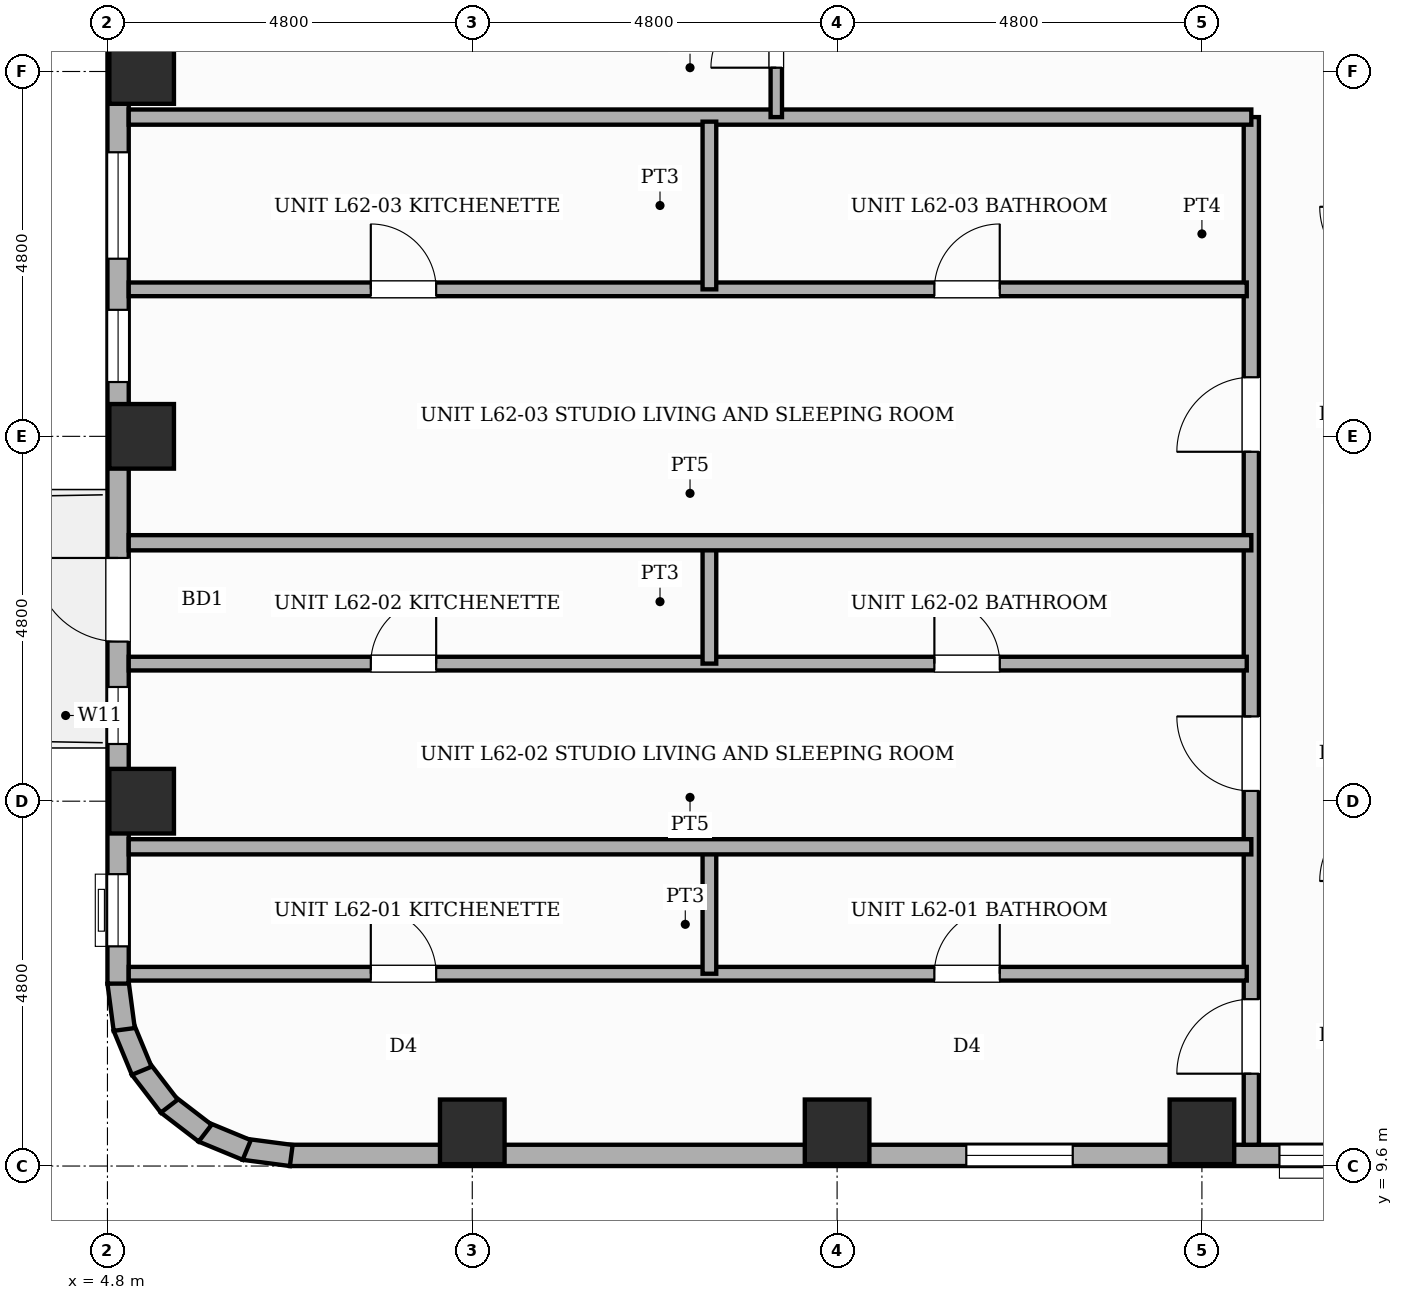
"""IFC4 building model, lengths in metres.
Left out: names, types, materials, properties, quantities, classifications, styles, units other than length and angle.
Written with IfcOpenShell. Run it as: python <this file> out.ifc"""

import sys

from ifc_helpers import new_model, si_unit, direction, frame, frame_2d, origin, origin_2d, place, context, subcontext, project, spatial, rectangle, extrude, element, fill, save


model = new_model("IFC4")
c1 = context("Model", 3, precision=1e-05, world=origin(), true_north=direction((0.0, 1.0)))
c2 = subcontext(c1, "Body", "Model", "MODEL_VIEW")
j1 = project(units=[si_unit("LENGTHUNIT", "METRE"), si_unit("PLANEANGLEUNIT", "RADIAN")], contexts=[c1])
p1 = place(None, origin())
s1 = spatial("IfcSite", under=j1, at=p1, CompositionType="ELEMENT")
p2 = place(p1, origin())
s2 = spatial("IfcBuilding", under=s1, at=p2, CompositionType="ELEMENT")
p3 = place(p2, frame((0.0, 0.0, 236.2)))
s3 = spatial("IfcBuildingStorey", under=s2, at=p3, CompositionType="ELEMENT", Elevation=236.2)
for number, where, z_axis, x_axis in (
    (1, (5.25, 14.4, 0.0), (0.0, 0.0, 1.0), (1.0, 0.0, 0.0)),
    (2, (5.25, 19.2, 0.0), (0.0, 0.0, 1.0), (1.0, 0.0, 0.0)),
    (3, (5.25, 24.0, 0.0), (0.0, 0.0, 1.0), (1.0, 0.0, 0.0)),
    (4, (9.6, 10.05, 0.0), (0.0, 0.0, 1.0), (1.0, 0.0, 0.0)),
    (5, (14.4, 10.05, 0.0), (0.0, 0.0, 1.0), (1.0, 0.0, 0.0)),
    (6, (19.2, 10.05, 0.0), (0.0, 0.0, 1.0), (1.0, 0.0, 0.0)),
):
    element("IfcColumn", number, at=place(p3, frame(where, z_axis=z_axis, x_axis=x_axis)), inside=s3, PredefinedType="COLUMN", context=c2, shape_type="SweptSolid", body=[
        extrude(rectangle(XDim=0.85, YDim=0.85, at=origin_2d()), origin(), (0.0, 0.0, 1.0), 3.6),
    ])
p4 = place(p3, frame((21.6, 9.74, 0.0), z_axis=(0.0, 0.0, 1.0), x_axis=(-1.0, 0.0, 0.0)))
e7 = element("IfcWall", 7, at=p4, inside=s3, PredefinedType="STANDARD", context=c2, shape_type="SweptSolid", body=[
    extrude(rectangle(XDim=14.4, YDim=0.28, at=frame_2d((7.2, 0.0))), origin(), (0.0, 0.0, 1.0), 2.6),
])
p5 = place(p4, frame((4.1, 0.0, 0.65)))
e8 = element("IfcOpeningElement", 8, at=p5, cuts=e7, PredefinedType="OPENING", context=c2, shape_type="SweptSolid", body=[
    extrude(rectangle(XDim=1.4, YDim=1.1, at=frame_2d((0.7, 0.55))), frame((0.0, 0.15, 0.0), z_axis=(0.0, -1.0, 0.0), x_axis=(1.0, 0.0, 0.0)), (0.0, 0.0, 1.0), 0.3),
])
p6 = place(p4, frame((0.43, 0.0, 0.45)))
e9 = element("IfcOpeningElement", 9, at=p6, cuts=e7, PredefinedType="OPENING", context=c2, shape_type="SweptSolid", body=[
    extrude(rectangle(XDim=0.95, YDim=1.8, at=frame_2d((0.475, 0.9))), frame((0.0, 0.15, 0.0), z_axis=(0.0, -1.0, 0.0), x_axis=(1.0, 0.0, 0.0)), (0.0, 0.0, 1.0), 0.3),
])
p7 = place(p3, frame((7.218, 9.739, 0.0), z_axis=(0.0, 0.0, 1.0), x_axis=(-0.9914410257, 0.130555323746, 0.0)))
e10 = element("IfcWall", 10, at=p7, inside=s3, PredefinedType="STANDARD", context=c2, shape_type="SweptSolid", body=[
    extrude(rectangle(XDim=0.626, YDim=0.28, at=frame_2d((0.313, 0.0))), origin(), (0.0, 0.0, 1.0), 3.32),
])
p8 = place(p3, frame((6.632, 9.811, 0.0), z_axis=(0.0, 0.0, 1.0), x_axis=(-0.923836271867, 0.382787856107, 0.0)))
e11 = element("IfcWall", 11, at=p8, inside=s3, PredefinedType="STANDARD", context=c2, shape_type="SweptSolid", body=[
    extrude(rectangle(XDim=0.626, YDim=0.28, at=frame_2d((0.313, 0.0))), origin(), (0.0, 0.0, 1.0), 3.32),
])
for number, where, z_axis, x_axis in (
    (12, (6.085, 10.033, 0.0), (0.0, 0.0, 1.0), (-0.793, 0.609, 0.0)),
    (13, (5.614, 10.388, 0.0), (0.0, 0.0, 1.0), (-0.609, 0.793, 0.0)),
    (14, (5.251, 10.854, 0.0), (0.0, 0.0, 1.0), (-0.383, 0.924, 0.0)),
    (15, (5.021, 11.397, 0.0), (0.0, 0.0, 1.0), (-0.131, 0.991, 0.0)),
):
    element("IfcWall", number, at=place(p3, frame(where, z_axis=z_axis, x_axis=x_axis)), inside=s3, PredefinedType="STANDARD", context=c2, shape_type="SweptSolid", body=[
        extrude(rectangle(XDim=0.626, YDim=0.28, at=frame_2d((0.313, 0.0))), origin(), (0.0, 0.0, 1.0), 3.32),
    ])
p9 = place(p3, frame((4.94, 12.0, 0.0), z_axis=(0.0, 0.0, 1.0), x_axis=(0.0, 1.0, 0.0)))
e16 = element("IfcWall", 16, at=p9, inside=s3, PredefinedType="STANDARD", context=c2, shape_type="SweptSolid", body=[
    extrude(rectangle(XDim=33.6, YDim=0.28, at=frame_2d((16.8, 0.0))), origin(), (0.0, 0.0, 1.0), 2.6),
])
p10 = place(p9, frame((4.5, 0.0, 0.0)))
e17 = element("IfcOpeningElement", 17, at=p10, cuts=e16, PredefinedType="OPENING", context=c2, shape_type="SweptSolid", body=[
    extrude(rectangle(XDim=1.1, YDim=2.15, at=frame_2d((0.55, 1.075))), frame((0.0, 0.15, 0.0), z_axis=(0.0, -1.0, 0.0), x_axis=(1.0, 0.0, 0.0)), (0.0, 0.0, 1.0), 0.3),
])
p11 = place(p9, frame((3.153, 0.0, 0.45)))
e18 = element("IfcOpeningElement", 18, at=p11, cuts=e16, PredefinedType="OPENING", context=c2, shape_type="SweptSolid", body=[
    extrude(rectangle(XDim=0.75, YDim=1.8, at=frame_2d((0.375, 0.9))), frame((0.0, 0.15, 0.0), z_axis=(0.0, -1.0, 0.0), x_axis=(1.0, 0.0, 0.0)), (0.0, 0.0, 1.0), 0.3),
])
p12 = place(p9, frame((7.915, 0.0, 0.45)))
e19 = element("IfcOpeningElement", 19, at=p12, cuts=e16, PredefinedType="OPENING", context=c2, shape_type="SweptSolid", body=[
    extrude(rectangle(XDim=0.95, YDim=1.8, at=frame_2d((0.475, 0.9))), frame((0.0, 0.15, 0.0), z_axis=(0.0, -1.0, 0.0), x_axis=(1.0, 0.0, 0.0)), (0.0, 0.0, 1.0), 0.3),
])
p13 = place(p9, frame((0.49, 0.0, 0.45)))
e20 = element("IfcOpeningElement", 20, at=p13, cuts=e16, PredefinedType="OPENING", context=c2, shape_type="SweptSolid", body=[
    extrude(rectangle(XDim=0.95, YDim=1.8, at=frame_2d((0.475, 0.9))), frame((0.0, 0.15, 0.0), z_axis=(0.0, -1.0, 0.0), x_axis=(1.0, 0.0, 0.0)), (0.0, 0.0, 1.0), 0.3),
])
p14 = place(p9, frame((9.537, 0.0, 0.65)))
e21 = element("IfcOpeningElement", 21, at=p14, cuts=e16, PredefinedType="OPENING", context=c2, shape_type="SweptSolid", body=[
    extrude(rectangle(XDim=1.4, YDim=1.1, at=frame_2d((0.7, 0.55))), frame((0.0, 0.15, 0.0), z_axis=(0.0, -1.0, 0.0), x_axis=(1.0, 0.0, 0.0)), (0.0, 0.0, 1.0), 0.3),
])
p15 = place(p9, frame((14.583, 0.0, 0.65)))
e22 = element("IfcOpeningElement", 22, at=p15, cuts=e16, PredefinedType="OPENING", context=c2, shape_type="SweptSolid", body=[
    extrude(rectangle(XDim=1.4, YDim=1.1, at=frame_2d((0.7, 0.55))), frame((0.0, 0.15, 0.0), z_axis=(0.0, -1.0, 0.0), x_axis=(1.0, 0.0, 0.0)), (0.0, 0.0, 1.0), 0.3),
])
p16 = place(p9, frame((12.718, 0.0, 0.45)))
e23 = element("IfcOpeningElement", 23, at=p16, cuts=e16, PredefinedType="OPENING", context=c2, shape_type="SweptSolid", body=[
    extrude(rectangle(XDim=0.75, YDim=1.8, at=frame_2d((0.375, 0.9))), frame((0.0, 0.15, 0.0), z_axis=(0.0, -1.0, 0.0), x_axis=(1.0, 0.0, 0.0)), (0.0, 0.0, 1.0), 0.3),
])
p17 = place(p3, frame((19.85, 9.88, 0.0), z_axis=(0.0, 0.0, 1.0), x_axis=(0.0, 1.0, 0.0)))
e24 = element("IfcWall", 24, at=p17, inside=s3, PredefinedType="PARTITIONING", context=c2, shape_type="SweptSolid", body=[
    extrude(rectangle(XDim=13.52, YDim=0.2, at=frame_2d((6.76, 0.0))), origin(), (0.0, 0.0, 1.0), 3.32),
])
p18 = place(p17, frame((0.935, 0.0, 0.0)))
e25 = element("IfcOpeningElement", 25, at=p18, cuts=e24, PredefinedType="OPENING", context=c2, shape_type="SweptSolid", body=[
    extrude(rectangle(XDim=0.98, YDim=2.18, at=frame_2d((0.49, 1.09))), frame((0.0, 0.11, 0.0), z_axis=(0.0, -1.0, 0.0), x_axis=(1.0, 0.0, 0.0)), (0.0, 0.0, 1.0), 0.22),
])
p19 = place(p17, frame((4.655, 0.0, 0.0)))
e26 = element("IfcOpeningElement", 26, at=p19, cuts=e24, PredefinedType="OPENING", context=c2, shape_type="SweptSolid", body=[
    extrude(rectangle(XDim=0.98, YDim=2.18, at=frame_2d((0.49, 1.09))), frame((0.0, 0.11, 0.0), z_axis=(0.0, -1.0, 0.0), x_axis=(1.0, 0.0, 0.0)), (0.0, 0.0, 1.0), 0.22),
])
p20 = place(p17, frame((9.117, 0.0, 0.0)))
e27 = element("IfcOpeningElement", 27, at=p20, cuts=e24, PredefinedType="OPENING", context=c2, shape_type="SweptSolid", body=[
    extrude(rectangle(XDim=0.98, YDim=2.18, at=frame_2d((0.49, 1.09))), frame((0.0, 0.11, 0.0), z_axis=(0.0, -1.0, 0.0), x_axis=(1.0, 0.0, 0.0)), (0.0, 0.0, 1.0), 0.22),
])
p21 = place(p3, frame((5.08, 23.4, 0.0), z_axis=(0.0, 0.0, 1.0), x_axis=(1.0, 0.0, 0.0)))
e28 = element("IfcWall", 28, at=p21, inside=s3, PredefinedType="PARTITIONING", context=c2, shape_type="SweptSolid", body=[
    extrude(rectangle(XDim=14.77, YDim=0.2, at=frame_2d((7.385, 0.0))), origin(), (0.0, 0.0, 1.0), 3.32),
])
p22 = place(p3, frame((13.6, 23.4, 0.0), z_axis=(0.0, 0.0, 1.0), x_axis=(0.0, 1.0, 0.0)))
e29 = element("IfcWall", 29, at=p22, inside=s3, PredefinedType="PARTITIONING", context=c2, shape_type="SweptSolid", body=[
    extrude(rectangle(XDim=2.35, YDim=0.15, at=frame_2d((1.175, 0.0))), origin(), (0.0, 0.0, 1.0), 3.32),
])
p23 = place(p22, frame((0.65, 0.0, 0.0)))
e30 = element("IfcOpeningElement", 30, at=p23, cuts=e29, PredefinedType="OPENING", context=c2, shape_type="SweptSolid", body=[
    extrude(rectangle(XDim=0.86, YDim=2.1, at=frame_2d((0.43, 1.05))), frame((0.0, 0.085, 0.0), z_axis=(0.0, -1.0, 0.0), x_axis=(1.0, 0.0, 0.0)), (0.0, 0.0, 1.0), 0.17),
])
p24 = place(p3, frame((5.08, 12.13, 0.0), z_axis=(0.0, 0.0, 1.0), x_axis=(1.0, 0.0, 0.0)))
e31 = element("IfcWall", 31, at=p24, inside=s3, PredefinedType="PLUMBINGWALL", context=c2, shape_type="SweptSolid", body=[
    extrude(rectangle(XDim=14.71, YDim=0.18, at=frame_2d((7.355, 0.0))), origin(), (0.0, 0.0, 1.0), 3.32),
])
p25 = place(p24, frame((3.185, 0.0, 0.0)))
e32 = element("IfcOpeningElement", 32, at=p25, cuts=e31, PredefinedType="OPENING", context=c2, shape_type="SweptSolid", body=[
    extrude(rectangle(XDim=0.86, YDim=2.1, at=frame_2d((0.43, 1.05))), frame((0.0, 0.1, 0.0), z_axis=(0.0, -1.0, 0.0), x_axis=(1.0, 0.0, 0.0)), (0.0, 0.0, 1.0), 0.2),
])
p26 = place(p24, frame((10.6, 0.0, 0.0)))
e33 = element("IfcOpeningElement", 33, at=p26, cuts=e31, PredefinedType="OPENING", context=c2, shape_type="SweptSolid", body=[
    extrude(rectangle(XDim=0.86, YDim=2.1, at=frame_2d((0.43, 1.05))), frame((0.0, 0.1, 0.0), z_axis=(0.0, -1.0, 0.0), x_axis=(1.0, 0.0, 0.0)), (0.0, 0.0, 1.0), 0.2),
])
p27 = place(p3, frame((12.72, 12.13, 0.0), z_axis=(0.0, 0.0, 1.0), x_axis=(0.0, 1.0, 0.0)))
e34 = element("IfcWall", 34, at=p27, inside=s3, PredefinedType="PLUMBINGWALL", context=c2, shape_type="SweptSolid", body=[
    extrude(rectangle(XDim=1.71, YDim=0.18, at=frame_2d((0.855, 0.0))), origin(), (0.0, 0.0, 1.0), 3.32),
])
p28 = place(p3, frame((5.08, 13.8, 0.0), z_axis=(0.0, 0.0, 1.0), x_axis=(1.0, 0.0, 0.0)))
e35 = element("IfcWall", 35, at=p28, inside=s3, PredefinedType="SOLIDWALL", context=c2, shape_type="SweptSolid", body=[
    extrude(rectangle(XDim=14.77, YDim=0.2, at=frame_2d((7.385, 0.0))), origin(), (0.0, 0.0, 1.0), 3.32),
])
p29 = place(p3, frame((5.08, 16.21, 0.0), z_axis=(0.0, 0.0, 1.0), x_axis=(1.0, 0.0, 0.0)))
e36 = element("IfcWall", 36, at=p29, inside=s3, PredefinedType="PLUMBINGWALL", context=c2, shape_type="SweptSolid", body=[
    extrude(rectangle(XDim=14.71, YDim=0.18, at=frame_2d((7.355, 0.0))), origin(), (0.0, 0.0, 1.0), 3.32),
])
p30 = place(p29, frame((3.185, 0.0, 0.0)))
e37 = element("IfcOpeningElement", 37, at=p30, cuts=e36, PredefinedType="OPENING", context=c2, shape_type="SweptSolid", body=[
    extrude(rectangle(XDim=0.86, YDim=2.1, at=frame_2d((0.43, 1.05))), frame((0.0, 0.1, 0.0), z_axis=(0.0, -1.0, 0.0), x_axis=(1.0, 0.0, 0.0)), (0.0, 0.0, 1.0), 0.2),
])
p31 = place(p29, frame((10.6, 0.0, 0.0)))
e38 = element("IfcOpeningElement", 38, at=p31, cuts=e36, PredefinedType="OPENING", context=c2, shape_type="SweptSolid", body=[
    extrude(rectangle(XDim=0.86, YDim=2.1, at=frame_2d((0.43, 1.05))), frame((0.0, 0.1, 0.0), z_axis=(0.0, -1.0, 0.0), x_axis=(1.0, 0.0, 0.0)), (0.0, 0.0, 1.0), 0.2),
])
p32 = place(p3, frame((12.72, 16.21, 0.0), z_axis=(0.0, 0.0, 1.0), x_axis=(0.0, 1.0, 0.0)))
e39 = element("IfcWall", 39, at=p32, inside=s3, PredefinedType="PLUMBINGWALL", context=c2, shape_type="SweptSolid", body=[
    extrude(rectangle(XDim=1.63, YDim=0.18, at=frame_2d((0.815, 0.0))), origin(), (0.0, 0.0, 1.0), 3.32),
])
p33 = place(p3, frame((5.08, 17.8, 0.0), z_axis=(0.0, 0.0, 1.0), x_axis=(1.0, 0.0, 0.0)))
e40 = element("IfcWall", 40, at=p33, inside=s3, PredefinedType="SOLIDWALL", context=c2, shape_type="SweptSolid", body=[
    extrude(rectangle(XDim=14.77, YDim=0.2, at=frame_2d((7.385, 0.0))), origin(), (0.0, 0.0, 1.0), 3.32),
])
p34 = place(p3, frame((5.08, 21.134, 0.0), z_axis=(0.0, 0.0, 1.0), x_axis=(1.0, 0.0, 0.0)))
e41 = element("IfcWall", 41, at=p34, inside=s3, PredefinedType="PLUMBINGWALL", context=c2, shape_type="SweptSolid", body=[
    extrude(rectangle(XDim=14.71, YDim=0.18, at=frame_2d((7.355, 0.0))), origin(), (0.0, 0.0, 1.0), 3.32),
])
p35 = place(p34, frame((3.185, 0.0, 0.0)))
e42 = element("IfcOpeningElement", 42, at=p35, cuts=e41, PredefinedType="OPENING", context=c2, shape_type="SweptSolid", body=[
    extrude(rectangle(XDim=0.86, YDim=2.1, at=frame_2d((0.43, 1.05))), frame((0.0, 0.1, 0.0), z_axis=(0.0, -1.0, 0.0), x_axis=(1.0, 0.0, 0.0)), (0.0, 0.0, 1.0), 0.2),
])
p36 = place(p34, frame((10.6, 0.0, 0.0)))
e43 = element("IfcOpeningElement", 43, at=p36, cuts=e41, PredefinedType="OPENING", context=c2, shape_type="SweptSolid", body=[
    extrude(rectangle(XDim=0.86, YDim=2.1, at=frame_2d((0.43, 1.05))), frame((0.0, 0.1, 0.0), z_axis=(0.0, -1.0, 0.0), x_axis=(1.0, 0.0, 0.0)), (0.0, 0.0, 1.0), 0.2),
])
p37 = place(p3, frame((12.72, 21.134, 0.0), z_axis=(0.0, 0.0, 1.0), x_axis=(0.0, 1.0, 0.0)))
e44 = element("IfcWall", 44, at=p37, inside=s3, PredefinedType="PLUMBINGWALL", context=c2, shape_type="SweptSolid", body=[
    extrude(rectangle(XDim=2.206, YDim=0.18, at=frame_2d((1.103, 0.0))), origin(), (0.0, 0.0, 1.0), 3.32),
])
p38 = place(p5, origin())
e45 = element("IfcWindow", 45, at=p38, inside=s3, PartitioningType="SINGLE_PANEL", PredefinedType="WINDOW", context=c2, shape_type="SweptSolid", body=[
    extrude(rectangle(XDim=1.4, YDim=1.1, at=frame_2d((0.7, 0.55))), frame((0.0, 0.03, 0.0), z_axis=(0.0, -1.0, 0.0), x_axis=(1.0, 0.0, 0.0)), (0.0, 0.0, 1.0), 0.06),
])
fill(e8, e45)
p39 = place(p6, origin())
e46 = element("IfcWindow", 46, at=p39, inside=s3, PartitioningType="SINGLE_PANEL", PredefinedType="WINDOW", context=c2, shape_type="SweptSolid", body=[
    extrude(rectangle(XDim=0.95, YDim=1.8, at=frame_2d((0.475, 0.9))), frame((0.0, 0.03, 0.0), z_axis=(0.0, -1.0, 0.0), x_axis=(1.0, 0.0, 0.0)), (0.0, 0.0, 1.0), 0.06),
])
fill(e9, e46)
p40 = place(p10, origin())
e47 = element("IfcDoor", 47, at=p40, inside=s3, OperationType="SINGLE_SWING_RIGHT", PredefinedType="DOOR", context=c2, shape_type="SweptSolid", body=[
    extrude(rectangle(XDim=1.1, YDim=2.15, at=frame_2d((0.55, 1.075))), frame((0.0, 0.025, 0.0), z_axis=(0.0, -1.0, 0.0), x_axis=(1.0, 0.0, 0.0)), (0.0, 0.0, 1.0), 0.05),
])
fill(e17, e47)
p41 = place(p11, origin())
e48 = element("IfcWindow", 48, at=p41, inside=s3, PartitioningType="SINGLE_PANEL", PredefinedType="WINDOW", context=c2, shape_type="SweptSolid", body=[
    extrude(rectangle(XDim=0.75, YDim=1.8, at=frame_2d((0.375, 0.9))), frame((0.0, 0.03, 0.0), z_axis=(0.0, -1.0, 0.0), x_axis=(1.0, 0.0, 0.0)), (0.0, 0.0, 1.0), 0.06),
])
fill(e18, e48)
p42 = place(p12, origin())
e49 = element("IfcWindow", 49, at=p42, inside=s3, PartitioningType="SINGLE_PANEL", PredefinedType="WINDOW", context=c2, shape_type="SweptSolid", body=[
    extrude(rectangle(XDim=0.95, YDim=1.8, at=frame_2d((0.475, 0.9))), frame((0.0, 0.03, 0.0), z_axis=(0.0, -1.0, 0.0), x_axis=(1.0, 0.0, 0.0)), (0.0, 0.0, 1.0), 0.06),
])
fill(e19, e49)
p43 = place(p13, origin())
e50 = element("IfcWindow", 50, at=p43, inside=s3, PartitioningType="SINGLE_PANEL", PredefinedType="WINDOW", context=c2, shape_type="SweptSolid", body=[
    extrude(rectangle(XDim=0.95, YDim=1.8, at=frame_2d((0.475, 0.9))), frame((0.0, 0.03, 0.0), z_axis=(0.0, -1.0, 0.0), x_axis=(1.0, 0.0, 0.0)), (0.0, 0.0, 1.0), 0.06),
])
fill(e20, e50)
p44 = place(p14, origin())
e51 = element("IfcWindow", 51, at=p44, inside=s3, PartitioningType="SINGLE_PANEL", PredefinedType="WINDOW", context=c2, shape_type="SweptSolid", body=[
    extrude(rectangle(XDim=1.4, YDim=1.1, at=frame_2d((0.7, 0.55))), frame((0.0, 0.03, 0.0), z_axis=(0.0, -1.0, 0.0), x_axis=(1.0, 0.0, 0.0)), (0.0, 0.0, 1.0), 0.06),
])
fill(e21, e51)
p45 = place(p23, origin())
e52 = element("IfcDoor", 52, at=p45, inside=s3, OperationType="SINGLE_SWING_LEFT", PredefinedType="DOOR", context=c2, shape_type="SweptSolid", body=[
    extrude(rectangle(XDim=0.86, YDim=2.1, at=frame_2d((0.43, 1.05))), frame((0.0, 0.025, 0.0), z_axis=(0.0, -1.0, 0.0), x_axis=(1.0, 0.0, 0.0)), (0.0, 0.0, 1.0), 0.05),
])
fill(e30, e52)
p46 = place(p18, origin())
e53 = element("IfcDoor", 53, at=p46, inside=s3, OperationType="SINGLE_SWING_LEFT", PredefinedType="DOOR", context=c2, shape_type="SweptSolid", body=[
    extrude(rectangle(XDim=0.98, YDim=2.18, at=frame_2d((0.49, 1.09))), frame((0.0, 0.025, 0.0), z_axis=(0.0, -1.0, 0.0), x_axis=(1.0, 0.0, 0.0)), (0.0, 0.0, 1.0), 0.05),
])
fill(e25, e53)
p47 = place(p25, origin())
e54 = element("IfcDoor", 54, at=p47, inside=s3, OperationType="SINGLE_SWING_LEFT", PredefinedType="DOOR", context=c2, shape_type="SweptSolid", body=[
    extrude(rectangle(XDim=0.86, YDim=2.1, at=frame_2d((0.43, 1.05))), frame((0.0, 0.025, 0.0), z_axis=(0.0, -1.0, 0.0), x_axis=(1.0, 0.0, 0.0)), (0.0, 0.0, 1.0), 0.05),
])
fill(e32, e54)
p48 = place(p26, origin())
e55 = element("IfcDoor", 55, at=p48, inside=s3, OperationType="SINGLE_SWING_RIGHT", PredefinedType="DOOR", context=c2, shape_type="SweptSolid", body=[
    extrude(rectangle(XDim=0.86, YDim=2.1, at=frame_2d((0.43, 1.05))), frame((0.0, 0.025, 0.0), z_axis=(0.0, -1.0, 0.0), x_axis=(1.0, 0.0, 0.0)), (0.0, 0.0, 1.0), 0.05),
])
fill(e33, e55)
p49 = place(p19, origin())
e56 = element("IfcDoor", 56, at=p49, inside=s3, OperationType="SINGLE_SWING_RIGHT", PredefinedType="DOOR", context=c2, shape_type="SweptSolid", body=[
    extrude(rectangle(XDim=0.98, YDim=2.18, at=frame_2d((0.49, 1.09))), frame((0.0, 0.025, 0.0), z_axis=(0.0, -1.0, 0.0), x_axis=(1.0, 0.0, 0.0)), (0.0, 0.0, 1.0), 0.05),
])
fill(e26, e56)
p50 = place(p30, origin())
e57 = element("IfcDoor", 57, at=p50, inside=s3, OperationType="SINGLE_SWING_RIGHT", PredefinedType="DOOR", context=c2, shape_type="SweptSolid", body=[
    extrude(rectangle(XDim=0.86, YDim=2.1, at=frame_2d((0.43, 1.05))), frame((0.0, 0.025, 0.0), z_axis=(0.0, -1.0, 0.0), x_axis=(1.0, 0.0, 0.0)), (0.0, 0.0, 1.0), 0.05),
])
fill(e37, e57)
p51 = place(p31, origin())
e58 = element("IfcDoor", 58, at=p51, inside=s3, OperationType="SINGLE_SWING_LEFT", PredefinedType="DOOR", context=c2, shape_type="SweptSolid", body=[
    extrude(rectangle(XDim=0.86, YDim=2.1, at=frame_2d((0.43, 1.05))), frame((0.0, 0.025, 0.0), z_axis=(0.0, -1.0, 0.0), x_axis=(1.0, 0.0, 0.0)), (0.0, 0.0, 1.0), 0.05),
])
fill(e38, e58)
p52 = place(p20, origin())
e59 = element("IfcDoor", 59, at=p52, inside=s3, OperationType="SINGLE_SWING_LEFT", PredefinedType="DOOR", context=c2, shape_type="SweptSolid", body=[
    extrude(rectangle(XDim=0.98, YDim=2.18, at=frame_2d((0.49, 1.09))), frame((0.0, 0.025, 0.0), z_axis=(0.0, -1.0, 0.0), x_axis=(1.0, 0.0, 0.0)), (0.0, 0.0, 1.0), 0.05),
])
fill(e27, e59)
p53 = place(p35, origin())
e60 = element("IfcDoor", 60, at=p53, inside=s3, OperationType="SINGLE_SWING_LEFT", PredefinedType="DOOR", context=c2, shape_type="SweptSolid", body=[
    extrude(rectangle(XDim=0.86, YDim=2.1, at=frame_2d((0.43, 1.05))), frame((0.0, 0.025, 0.0), z_axis=(0.0, -1.0, 0.0), x_axis=(1.0, 0.0, 0.0)), (0.0, 0.0, 1.0), 0.05),
])
fill(e42, e60)
p54 = place(p36, origin())
e61 = element("IfcDoor", 61, at=p54, inside=s3, OperationType="SINGLE_SWING_RIGHT", PredefinedType="DOOR", context=c2, shape_type="SweptSolid", body=[
    extrude(rectangle(XDim=0.86, YDim=2.1, at=frame_2d((0.43, 1.05))), frame((0.0, 0.025, 0.0), z_axis=(0.0, -1.0, 0.0), x_axis=(1.0, 0.0, 0.0)), (0.0, 0.0, 1.0), 0.05),
])
fill(e43, e61)
save(model, sys.argv[1])
